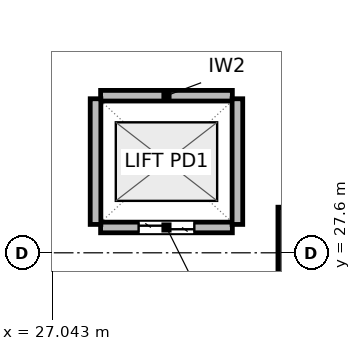
"""IFC4 building model, lengths in metres.
Left out: names, types, materials, properties, quantities, classifications, styles, units other than length and angle.
Written with IfcOpenShell. Run it as: python <this file> out.ifc"""

import sys

from ifc_helpers import new_model, si_unit, direction, frame, frame_2d, origin, origin_2d, place, context, subcontext, project, spatial, rectangle, extrude, element, fill, save


model = new_model("IFC4")
c1 = context("Model", 3, precision=1e-05, world=origin(), true_north=direction((0.0, 1.0)))
c2 = subcontext(c1, "Body", "Model", "MODEL_VIEW")
j1 = project(units=[si_unit("LENGTHUNIT", "METRE"), si_unit("PLANEANGLEUNIT", "RADIAN")], contexts=[c1])
p1 = place(None, origin())
s1 = spatial("IfcSite", under=j1, at=p1, CompositionType="ELEMENT")
p2 = place(p1, origin())
s2 = spatial("IfcBuilding", under=s1, at=p2, CompositionType="ELEMENT")
p3 = place(p2, frame((0.0, 0.0, 8.7)))
s3 = spatial("IfcBuildingStorey", under=s2, at=p3, CompositionType="ELEMENT", Elevation=8.7)
p4 = place(p3, frame((32.4, 27.6, 0.0), z_axis=(0.0, 0.0, 1.0), x_axis=(1.0, 0.0, 0.0)))
e1 = element("IfcColumn", 1, at=p4, inside=s3, PredefinedType="COLUMN", context=c2, shape_type="SweptSolid", body=[
    extrude(rectangle(XDim=1.8, YDim=1.8, at=origin_2d()), origin(), (0.0, 0.0, 1.0), 4.2),
])
p5 = place(p3, frame((28.0, 28.1, 0.0), z_axis=(0.0, 0.0, 1.0), x_axis=(1.0, 0.0, 0.0)))
e2 = element("IfcWall", 2, at=p5, inside=s3, PredefinedType="PARTITIONING", context=c2, shape_type="SweptSolid", body=[
    extrude(rectangle(XDim=2.6, YDim=0.21, at=frame_2d((1.3, 0.0))), origin(), (0.0, 0.0, 1.0), 3.88),
])
p6 = place(p5, frame((0.75, 0.0, 0.0)))
e3 = element("IfcOpeningElement", 3, at=p6, cuts=e2, PredefinedType="OPENING", context=c2, shape_type="SweptSolid", body=[
    extrude(rectangle(XDim=1.1, YDim=2.04, at=frame_2d((0.55, 1.02))), frame((0.0, 0.115, 0.0), z_axis=(0.0, -1.0, 0.0), x_axis=(1.0, 0.0, 0.0)), (0.0, 0.0, 1.0), 0.23),
])
p7 = place(p3, frame((28.0, 30.7, 0.0), z_axis=(0.0, 0.0, 1.0), x_axis=(1.0, 0.0, 0.0)))
e4 = element("IfcWall", 4, at=p7, inside=s3, PredefinedType="PARTITIONING", context=c2, shape_type="SweptSolid", body=[
    extrude(rectangle(XDim=2.6, YDim=0.21, at=frame_2d((1.3, 0.0))), origin(), (0.0, 0.0, 1.0), 3.88),
])
for number, where, z_axis, x_axis in (
    (5, (27.9, 28.16, 0.0), (0.0, 0.0, 1.0), (0.0, 1.0, 0.0)),
    (6, (30.7, 28.16, 0.0), (0.0, 0.0, 1.0), (0.0, 1.0, 0.0)),
):
    element("IfcWall", number, at=place(p3, frame(where, z_axis=z_axis, x_axis=x_axis)), inside=s3, PredefinedType="PARTITIONING", context=c2, shape_type="SweptSolid", body=[
        extrude(rectangle(XDim=2.48, YDim=0.21, at=frame_2d((1.24, 0.0))), origin(), (0.0, 0.0, 1.0), 3.88),
    ])
p8 = place(p6, origin())
e7 = element("IfcDoor", 7, at=p8, inside=s3, OperationType="DOUBLE_DOOR_SLIDING", PredefinedType="DOOR", context=c2, shape_type="SweptSolid", body=[
    extrude(rectangle(XDim=1.1, YDim=2.04, at=frame_2d((0.55, 1.02))), frame((0.0, 0.025, 0.0), z_axis=(0.0, -1.0, 0.0), x_axis=(1.0, 0.0, 0.0)), (0.0, 0.0, 1.0), 0.05),
])
fill(e3, e7)
save(model, sys.argv[1])
